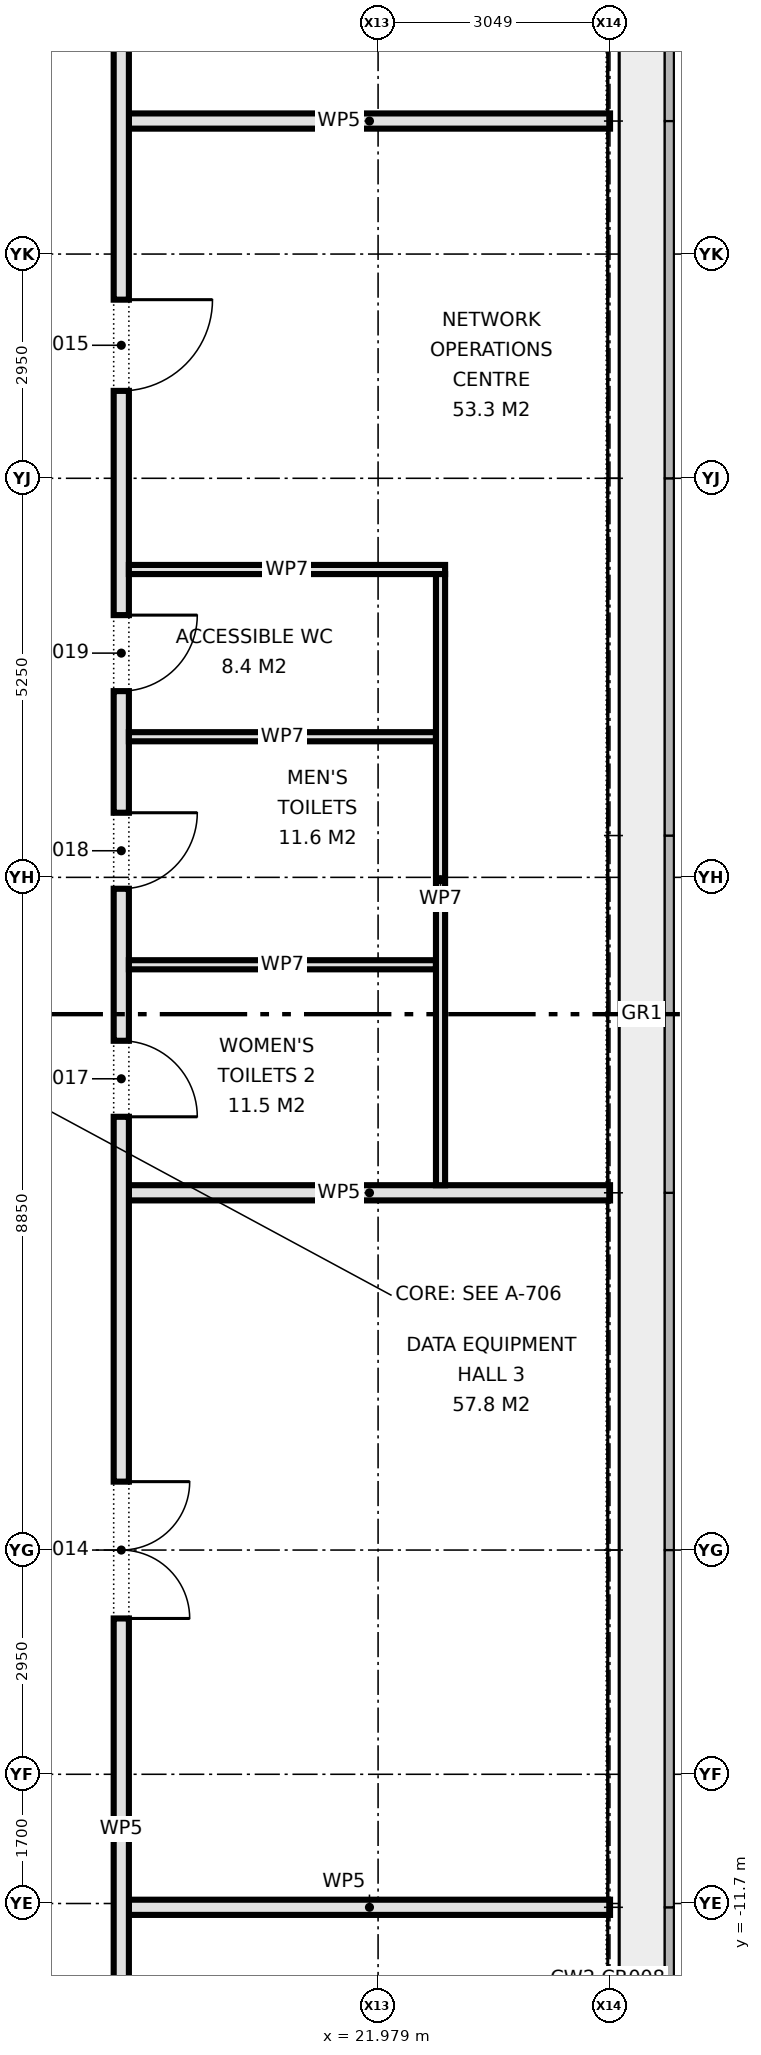
"""IFC4 building model, lengths in metres.
Left out: names, types, materials, properties, quantities, classifications, styles, units other than length and angle.
Written with IfcOpenShell. Run it as: python <this file> out.ifc"""

import sys

from ifc_helpers import new_model, si_unit, direction, frame, frame_2d, origin, place, context, subcontext, project, spatial, rectangle, extrude, element, fill, save


model = new_model("IFC4")
c1 = context("Model", 3, precision=1e-05, world=origin(), true_north=direction((0.0, 1.0)))
c2 = subcontext(c1, "Body", "Model", "MODEL_VIEW")
j1 = project(units=[si_unit("LENGTHUNIT", "METRE"), si_unit("PLANEANGLEUNIT", "RADIAN")], contexts=[c1])
p1 = place(None, origin())
s1 = spatial("IfcSite", under=j1, at=p1, CompositionType="ELEMENT")
p2 = place(p1, origin())
s2 = spatial("IfcBuilding", under=s1, at=p2, CompositionType="ELEMENT")
p3 = place(p2, frame((0.0, 0.0, 35.3)))
s3 = spatial("IfcBuildingStorey", under=s2, at=p3, CompositionType="ELEMENT", Elevation=35.3)
for number, where, z_axis, x_axis in (
    (1, (18.7, -11.75, 0.0), (0.0, 0.0, 1.0), (1.0, 0.0, 0.0)),
    (2, (18.7, -2.35, 0.0), (0.0, 0.0, 1.0), (1.0, 0.0, 0.0)),
    (3, (18.7, 11.75, 0.0), (0.0, 0.0, 1.0), (1.0, 0.0, 0.0)),
):
    element("IfcWall", number, at=place(p3, frame(where, z_axis=z_axis, x_axis=x_axis)), inside=s3, PredefinedType="PARTITIONING", context=c2, shape_type="SweptSolid", body=[
        extrude(rectangle(XDim=6.33, YDim=0.2, at=frame_2d((3.165, 0.0))), origin(), (0.0, 0.0, 1.0), 4.575),
    ])
p4 = place(p3, frame((18.6, -13.5, 0.0), z_axis=(0.0, 0.0, 1.0), x_axis=(0.0, 1.0, 0.0)))
e4 = element("IfcWall", 4, at=p4, inside=s3, PredefinedType="PARTITIONING", context=c2, shape_type="SweptSolid", body=[
    extrude(rectangle(XDim=27.0, YDim=0.2, at=frame_2d((13.5, 0.0))), origin(), (0.0, 0.0, 1.0), 4.575),
])
p5 = place(p4, frame((5.55, 0.0, 0.0)))
e5 = element("IfcOpeningElement", 5, at=p5, cuts=e4, PredefinedType="OPENING", context=c2, shape_type="SweptSolid", body=[
    extrude(rectangle(XDim=1.8, YDim=2.1, at=frame_2d((0.9, 1.05))), frame((0.0, 0.11, 0.0), z_axis=(0.0, -1.0, 0.0), x_axis=(1.0, 0.0, 0.0)), (0.0, 0.0, 1.0), 0.22),
])
p6 = place(p4, frame((21.7, 0.0, 0.0)))
e6 = element("IfcOpeningElement", 6, at=p6, cuts=e4, PredefinedType="OPENING", context=c2, shape_type="SweptSolid", body=[
    extrude(rectangle(XDim=1.2, YDim=2.1, at=frame_2d((0.6, 1.05))), frame((0.0, 0.11, 0.0), z_axis=(0.0, -1.0, 0.0), x_axis=(1.0, 0.0, 0.0)), (0.0, 0.0, 1.0), 0.22),
])
p7 = place(p4, frame((12.15, 0.0, 0.0)))
e7 = element("IfcOpeningElement", 7, at=p7, cuts=e4, PredefinedType="OPENING", context=c2, shape_type="SweptSolid", body=[
    extrude(rectangle(XDim=1.0, YDim=2.1, at=frame_2d((0.5, 1.05))), frame((0.0, 0.11, 0.0), z_axis=(0.0, -1.0, 0.0), x_axis=(1.0, 0.0, 0.0)), (0.0, 0.0, 1.0), 0.22),
])
p8 = place(p4, frame((15.15, 0.0, 0.0)))
e8 = element("IfcOpeningElement", 8, at=p8, cuts=e4, PredefinedType="OPENING", context=c2, shape_type="SweptSolid", body=[
    extrude(rectangle(XDim=1.0, YDim=2.1, at=frame_2d((0.5, 1.05))), frame((0.0, 0.11, 0.0), z_axis=(0.0, -1.0, 0.0), x_axis=(1.0, 0.0, 0.0)), (0.0, 0.0, 1.0), 0.22),
])
p9 = place(p4, frame((17.75, 0.0, 0.0)))
e9 = element("IfcOpeningElement", 9, at=p9, cuts=e4, PredefinedType="OPENING", context=c2, shape_type="SweptSolid", body=[
    extrude(rectangle(XDim=1.0, YDim=2.1, at=frame_2d((0.5, 1.05))), frame((0.0, 0.11, 0.0), z_axis=(0.0, -1.0, 0.0), x_axis=(1.0, 0.0, 0.0)), (0.0, 0.0, 1.0), 0.22),
])
for number, where, z_axis, x_axis in (
    (10, (18.7, 0.65, 0.0), (0.0, 0.0, 1.0), (1.0, 0.0, 0.0)),
    (11, (18.7, 3.65, 0.0), (0.0, 0.0, 1.0), (1.0, 0.0, 0.0)),
):
    element("IfcWall", number, at=place(p3, frame(where, z_axis=z_axis, x_axis=x_axis)), inside=s3, PredefinedType="PARTITIONING", context=c2, shape_type="SweptSolid", body=[
        extrude(rectangle(XDim=4.04, YDim=0.12, at=frame_2d((2.02, 0.0))), origin(), (0.0, 0.0, 1.0), 4.575),
    ])
p10 = place(p3, frame((18.7, 5.85, 0.0), z_axis=(0.0, 0.0, 1.0), x_axis=(1.0, 0.0, 0.0)))
e12 = element("IfcWall", 12, at=p10, inside=s3, PredefinedType="PARTITIONING", context=c2, shape_type="SweptSolid", body=[
    extrude(rectangle(XDim=4.16, YDim=0.12, at=frame_2d((2.08, 0.0))), origin(), (0.0, 0.0, 1.0), 4.575),
])
p11 = place(p3, frame((22.8, -2.25, 0.0), z_axis=(0.0, 0.0, 1.0), x_axis=(0.0, 1.0, 0.0)))
e13 = element("IfcWall", 13, at=p11, inside=s3, PredefinedType="PARTITIONING", context=c2, shape_type="SweptSolid", body=[
    extrude(rectangle(XDim=8.04, YDim=0.12, at=frame_2d((4.02, 0.0))), origin(), (0.0, 0.0, 1.0), 4.575),
])
p12 = place(p5, frame((1.8, 0.0, 0.0), z_axis=(0.0, 0.0, 1.0), x_axis=(-1.0, 0.0, 0.0)))
e14 = element("IfcDoor", 14, at=p12, inside=s3, OperationType="DOUBLE_DOOR_SINGLE_SWING", PredefinedType="DOOR", context=c2, shape_type="SweptSolid", body=[
    extrude(rectangle(XDim=1.8, YDim=2.1, at=frame_2d((0.9, 1.05))), frame((0.0, 0.025, 0.0), z_axis=(0.0, -1.0, 0.0), x_axis=(1.0, 0.0, 0.0)), (0.0, 0.0, 1.0), 0.05),
])
fill(e5, e14)
p13 = place(p6, frame((1.2, 0.0, 0.0), z_axis=(0.0, 0.0, 1.0), x_axis=(-1.0, 0.0, 0.0)))
e15 = element("IfcDoor", 15, at=p13, inside=s3, OperationType="SINGLE_SWING_LEFT", PredefinedType="DOOR", context=c2, shape_type="SweptSolid", body=[
    extrude(rectangle(XDim=1.2, YDim=2.1, at=frame_2d((0.6, 1.05))), frame((0.0, 0.025, 0.0), z_axis=(0.0, -1.0, 0.0), x_axis=(1.0, 0.0, 0.0)), (0.0, 0.0, 1.0), 0.05),
])
fill(e6, e15)
p14 = place(p7, frame((1.0, 0.0, 0.0), z_axis=(0.0, 0.0, 1.0), x_axis=(-1.0, 0.0, 0.0)))
e16 = element("IfcDoor", 16, at=p14, inside=s3, OperationType="SINGLE_SWING_RIGHT", PredefinedType="DOOR", context=c2, shape_type="SweptSolid", body=[
    extrude(rectangle(XDim=1.0, YDim=2.1, at=frame_2d((0.5, 1.05))), frame((0.0, 0.025, 0.0), z_axis=(0.0, -1.0, 0.0), x_axis=(1.0, 0.0, 0.0)), (0.0, 0.0, 1.0), 0.05),
])
fill(e7, e16)
p15 = place(p8, frame((1.0, 0.0, 0.0), z_axis=(0.0, 0.0, 1.0), x_axis=(-1.0, 0.0, 0.0)))
e17 = element("IfcDoor", 17, at=p15, inside=s3, OperationType="SINGLE_SWING_LEFT", PredefinedType="DOOR", context=c2, shape_type="SweptSolid", body=[
    extrude(rectangle(XDim=1.0, YDim=2.1, at=frame_2d((0.5, 1.05))), frame((0.0, 0.025, 0.0), z_axis=(0.0, -1.0, 0.0), x_axis=(1.0, 0.0, 0.0)), (0.0, 0.0, 1.0), 0.05),
])
fill(e8, e17)
p16 = place(p9, frame((1.0, 0.0, 0.0), z_axis=(0.0, 0.0, 1.0), x_axis=(-1.0, 0.0, 0.0)))
e18 = element("IfcDoor", 18, at=p16, inside=s3, OperationType="SINGLE_SWING_LEFT", PredefinedType="DOOR", context=c2, shape_type="SweptSolid", body=[
    extrude(rectangle(XDim=1.0, YDim=2.1, at=frame_2d((0.5, 1.05))), frame((0.0, 0.025, 0.0), z_axis=(0.0, -1.0, 0.0), x_axis=(1.0, 0.0, 0.0)), (0.0, 0.0, 1.0), 0.05),
])
fill(e9, e18)
save(model, sys.argv[1])
